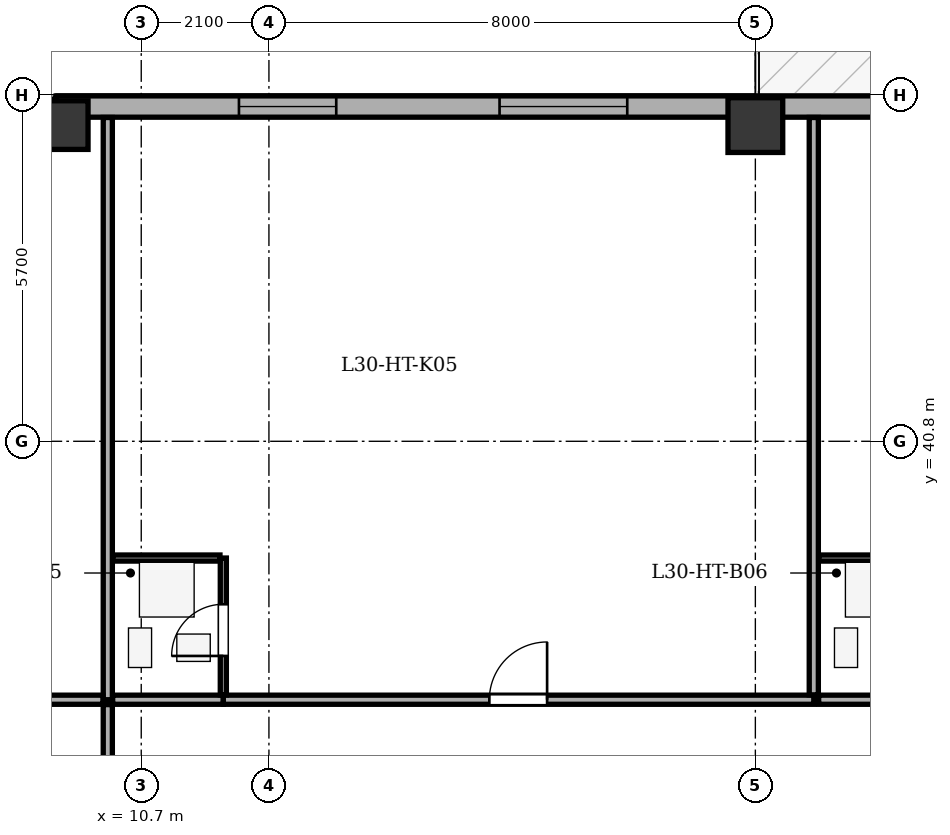
"""IFC4 building model, lengths in metres.
Left out: names, types, materials, properties, quantities, classifications, styles, units other than length and angle.
Written with IfcOpenShell. Run it as: python <this file> out.ifc"""

import sys

from ifc_helpers import new_model, si_unit, direction, frame, frame_2d, origin, origin_2d, place, context, subcontext, project, spatial, rectangle, extrude, element, fill, save


model = new_model("IFC4")
c1 = context("Model", 3, precision=1e-05, world=origin(), true_north=direction((0.0, 1.0)))
c2 = subcontext(c1, "Body", "Model", "MODEL_VIEW")
j1 = project(units=[si_unit("LENGTHUNIT", "METRE"), si_unit("PLANEANGLEUNIT", "RADIAN")], contexts=[c1])
p1 = place(None, origin())
s1 = spatial("IfcSite", under=j1, at=p1, CompositionType="ELEMENT")
p2 = place(p1, origin())
s2 = spatial("IfcBuilding", under=s1, at=p2, CompositionType="ELEMENT")
p3 = place(p2, frame((0.0, 0.0, 123.8)))
s3 = spatial("IfcBuildingStorey", under=s2, at=p3, CompositionType="ELEMENT", Elevation=123.8)
p4 = place(p3, frame((9.3, 46.0, 0.0), z_axis=(0.0, 0.0, 1.0), x_axis=(1.0, 0.0, 0.0)))
e1 = element("IfcColumn", 1, at=p4, inside=s3, PredefinedType="COLUMN", context=c2, shape_type="SweptSolid", body=[
    extrude(rectangle(XDim=0.8, YDim=1.05, at=origin_2d()), origin(), (0.0, 0.0, 1.0), 3.5),
])
p5 = place(p3, frame((20.8, 46.0, 0.0), z_axis=(0.0, 0.0, 1.0), x_axis=(1.0, 0.0, 0.0)))
e2 = element("IfcColumn", 2, at=p5, inside=s3, PredefinedType="COLUMN", context=c2, shape_type="SweptSolid", body=[
    extrude(rectangle(XDim=0.9, YDim=0.9, at=origin_2d()), origin(), (0.0, 0.0, 1.0), 3.5),
])
p6 = place(p3, frame((4.495, 41.5, 0.0), z_axis=(0.0, 0.0, 1.0), x_axis=(0.707106781187, 0.707106781187, 0.0)))
e3 = element("IfcWall", 3, at=p6, inside=s3, PredefinedType="STANDARD", context=c2, shape_type="SweptSolid", body=[
    extrude(rectangle(XDim=6.795, YDim=0.35, at=frame_2d((3.397, 0.0))), origin(), (0.0, 0.0, 1.0), 2.785),
])
p7 = place(p6, frame((2.698, 0.0, 0.75)))
e4 = element("IfcOpeningElement", 4, at=p7, cuts=e3, PredefinedType="OPENING", context=c2, shape_type="SweptSolid", body=[
    extrude(rectangle(XDim=1.4, YDim=1.65, at=frame_2d((0.7, 0.825))), frame((0.0, 0.185, 0.0), z_axis=(0.0, -1.0, 0.0), x_axis=(1.0, 0.0, 0.0)), (0.0, 0.0, 1.0), 0.37),
])
p8 = place(p3, frame((9.3, 46.305, 0.0), z_axis=(0.0, 0.0, 1.0), x_axis=(1.0, 0.0, 0.0)))
e5 = element("IfcWall", 5, at=p8, inside=s3, PredefinedType="STANDARD", context=c2, shape_type="SweptSolid", body=[
    extrude(rectangle(XDim=35.0, YDim=0.35, at=frame_2d((17.5, 0.0))), origin(), (0.0, 0.0, 1.0), 2.785),
])
p9 = place(p8, frame((14.4, 0.0, 0.0)))
e6 = element("IfcOpeningElement", 6, at=p9, cuts=e5, PredefinedType="OPENING", context=c2, shape_type="SweptSolid", body=[
    extrude(rectangle(XDim=1.0, YDim=2.02, at=frame_2d((0.5, 1.01))), frame((0.0, 0.185, 0.0), z_axis=(0.0, -1.0, 0.0), x_axis=(1.0, 0.0, 0.0)), (0.0, 0.0, 1.0), 0.37),
])
p10 = place(p8, frame((3.007, 0.0, 0.75)))
e7 = element("IfcOpeningElement", 7, at=p10, cuts=e5, PredefinedType="OPENING", context=c2, shape_type="SweptSolid", body=[
    extrude(rectangle(XDim=1.6, YDim=1.75, at=frame_2d((0.8, 0.875))), frame((0.0, 0.185, 0.0), z_axis=(0.0, -1.0, 0.0), x_axis=(1.0, 0.0, 0.0)), (0.0, 0.0, 1.0), 0.37),
])
p11 = place(p8, frame((7.293, 0.0, 0.75)))
e8 = element("IfcOpeningElement", 8, at=p11, cuts=e5, PredefinedType="OPENING", context=c2, shape_type="SweptSolid", body=[
    extrude(rectangle(XDim=2.1, YDim=1.75, at=frame_2d((1.05, 0.875))), frame((0.0, 0.185, 0.0), z_axis=(0.0, -1.0, 0.0), x_axis=(1.0, 0.0, 0.0)), (0.0, 0.0, 1.0), 0.37),
])
p12 = place(p8, frame((21.198, 0.0, 0.75)))
e9 = element("IfcOpeningElement", 9, at=p12, cuts=e5, PredefinedType="OPENING", context=c2, shape_type="SweptSolid", body=[
    extrude(rectangle(XDim=1.6, YDim=1.75, at=frame_2d((0.8, 0.875))), frame((0.0, 0.185, 0.0), z_axis=(0.0, -1.0, 0.0), x_axis=(1.0, 0.0, 0.0)), (0.0, 0.0, 1.0), 0.37),
])
p13 = place(p8, frame((27.783, 0.0, 0.75)))
e10 = element("IfcOpeningElement", 10, at=p13, cuts=e5, PredefinedType="OPENING", context=c2, shape_type="SweptSolid", body=[
    extrude(rectangle(XDim=1.6, YDim=1.75, at=frame_2d((0.8, 0.875))), frame((0.0, 0.185, 0.0), z_axis=(0.0, -1.0, 0.0), x_axis=(1.0, 0.0, 0.0)), (0.0, 0.0, 1.0), 0.37),
])
p14 = place(p8, frame((31.192, 0.0, 0.75)))
e11 = element("IfcOpeningElement", 11, at=p14, cuts=e5, PredefinedType="OPENING", context=c2, shape_type="SweptSolid", body=[
    extrude(rectangle(XDim=2.1, YDim=1.75, at=frame_2d((1.05, 0.875))), frame((0.0, 0.185, 0.0), z_axis=(0.0, -1.0, 0.0), x_axis=(1.0, 0.0, 0.0)), (0.0, 0.0, 1.0), 0.37),
])
p15 = place(p3, frame((10.15, 36.55, 0.0), z_axis=(0.0, 0.0, 1.0), x_axis=(0.0, 1.0, 0.0)))
e12 = element("IfcWall", 12, at=p15, inside=s3, PredefinedType="PARTITIONING", context=c2, shape_type="SweptSolid", body=[
    extrude(rectangle(XDim=9.575, YDim=0.15, at=frame_2d((4.788, 0.0))), origin(), (0.0, 0.0, 1.0), 3.2),
])
p16 = place(p3, frame((10.23, 36.55, 0.0), z_axis=(0.0, 0.0, 1.0), x_axis=(1.0, 0.0, 0.0)))
e13 = element("IfcWall", 13, at=p16, inside=s3, PredefinedType="PARTITIONING", context=c2, shape_type="SweptSolid", body=[
    extrude(rectangle(XDim=1.82, YDim=0.15, at=frame_2d((0.91, 0.0))), origin(), (0.0, 0.0, 1.0), 3.2),
])
p17 = place(p3, frame((12.05, 36.55, 0.0), z_axis=(0.0, 0.0, 1.0), x_axis=(1.0, 0.0, 0.0)))
e14 = element("IfcWall", 14, at=p17, inside=s3, PredefinedType="PARTITIONING", context=c2, shape_type="SweptSolid", body=[
    extrude(rectangle(XDim=9.711, YDim=0.15, at=frame_2d((4.855, 0.0))), origin(), (0.0, 0.0, 1.0), 3.2),
])
p18 = place(p17, frame((4.375, 0.0, 0.0)))
e15 = element("IfcOpeningElement", 15, at=p18, cuts=e14, PredefinedType="OPENING", context=c2, shape_type="SweptSolid", body=[
    extrude(rectangle(XDim=0.95, YDim=2.1, at=frame_2d((0.475, 1.05))), frame((0.0, 0.085, 0.0), z_axis=(0.0, -1.0, 0.0), x_axis=(1.0, 0.0, 0.0)), (0.0, 0.0, 1.0), 0.17),
])
p19 = place(p3, frame((12.05, 36.63, 0.0), z_axis=(0.0, 0.0, 1.0), x_axis=(0.0, 1.0, 0.0)))
e16 = element("IfcWall", 16, at=p19, inside=s3, PredefinedType="PARTITIONING", context=c2, shape_type="SweptSolid", body=[
    extrude(rectangle(XDim=2.25, YDim=0.1, at=frame_2d((1.125, 0.0))), origin(), (0.0, 0.0, 1.0), 3.2),
])
p20 = place(p19, frame((0.64, 0.0, 0.0)))
e17 = element("IfcOpeningElement", 17, at=p20, cuts=e16, PredefinedType="OPENING", context=c2, shape_type="SweptSolid", body=[
    extrude(rectangle(XDim=0.85, YDim=2.05, at=frame_2d((0.425, 1.025))), frame((0.0, 0.06, 0.0), z_axis=(0.0, -1.0, 0.0), x_axis=(1.0, 0.0, 0.0)), (0.0, 0.0, 1.0), 0.12),
])
p21 = place(p3, frame((10.23, 38.88, 0.0), z_axis=(0.0, 0.0, 1.0), x_axis=(1.0, 0.0, 0.0)))
e18 = element("IfcWall", 18, at=p21, inside=s3, PredefinedType="PARTITIONING", context=c2, shape_type="SweptSolid", body=[
    extrude(rectangle(XDim=1.765, YDim=0.1, at=frame_2d((0.883, 0.0))), origin(), (0.0, 0.0, 1.0), 3.2),
])
p22 = place(p3, frame((21.761, 36.63, 0.0), z_axis=(0.0, 0.0, 1.0), x_axis=(0.0, 1.0, 0.0)))
e19 = element("IfcWall", 19, at=p22, inside=s3, PredefinedType="PARTITIONING", context=c2, shape_type="SweptSolid", body=[
    extrude(rectangle(XDim=9.495, YDim=0.15, at=frame_2d((4.748, 0.0))), origin(), (0.0, 0.0, 1.0), 3.2),
])
p23 = place(p3, frame((21.841, 36.55, 0.0), z_axis=(0.0, 0.0, 1.0), x_axis=(1.0, 0.0, 0.0)))
e20 = element("IfcWall", 20, at=p23, inside=s3, PredefinedType="PARTITIONING", context=c2, shape_type="SweptSolid", body=[
    extrude(rectangle(XDim=1.82, YDim=0.15, at=frame_2d((0.91, 0.0))), origin(), (0.0, 0.0, 1.0), 3.2),
])
p24 = place(p3, frame((21.841, 38.88, 0.0), z_axis=(0.0, 0.0, 1.0), x_axis=(1.0, 0.0, 0.0)))
e21 = element("IfcWall", 21, at=p24, inside=s3, PredefinedType="PARTITIONING", context=c2, shape_type="SweptSolid", body=[
    extrude(rectangle(XDim=1.765, YDim=0.1, at=frame_2d((0.882, 0.0))), origin(), (0.0, 0.0, 1.0), 3.2),
])
p25 = place(p3, frame((4.675, 36.55, 0.0), z_axis=(0.0, 0.0, 1.0), x_axis=(1.0, 0.0, 0.0)))
e22 = element("IfcWall", 22, at=p25, inside=s3, PredefinedType="PARTITIONING", context=c2, shape_type="SweptSolid", body=[
    extrude(rectangle(XDim=5.395, YDim=0.15, at=frame_2d((2.698, 0.0))), origin(), (0.0, 0.0, 1.0), 3.2),
])
p26 = place(p3, frame((10.15, 17.93, 0.0), z_axis=(0.0, 0.0, 1.0), x_axis=(0.0, 1.0, 0.0)))
e23 = element("IfcWall", 23, at=p26, inside=s3, PredefinedType="PARTITIONING", context=c2, shape_type="SweptSolid", body=[
    extrude(rectangle(XDim=18.54, YDim=0.15, at=frame_2d((9.27, 0.0))), origin(), (0.0, 0.0, 1.0), 3.2),
])
p27 = place(p26, frame((8.79, 0.0, 0.0)))
e24 = element("IfcOpeningElement", 24, at=p27, cuts=e23, PredefinedType="OPENING", context=c2, shape_type="SweptSolid", body=[
    extrude(rectangle(XDim=0.95, YDim=2.1, at=frame_2d((0.475, 1.05))), frame((0.0, 0.085, 0.0), z_axis=(0.0, -1.0, 0.0), x_axis=(1.0, 0.0, 0.0)), (0.0, 0.0, 1.0), 0.17),
])
p28 = place(p10, origin())
e25 = element("IfcWindow", 25, at=p28, inside=s3, PartitioningType="SINGLE_PANEL", PredefinedType="WINDOW", context=c2, shape_type="SweptSolid", body=[
    extrude(rectangle(XDim=1.6, YDim=1.75, at=frame_2d((0.8, 0.875))), frame((0.0, -0.01, 0.0), z_axis=(0.0, -1.0, 0.0), x_axis=(1.0, 0.0, 0.0)), (0.0, 0.0, 1.0), 0.06),
])
fill(e7, e25)
p29 = place(p11, origin())
e26 = element("IfcWindow", 26, at=p29, inside=s3, PartitioningType="SINGLE_PANEL", PredefinedType="WINDOW", context=c2, shape_type="SweptSolid", body=[
    extrude(rectangle(XDim=2.1, YDim=1.75, at=frame_2d((1.05, 0.875))), frame((0.0, -0.01, 0.0), z_axis=(0.0, -1.0, 0.0), x_axis=(1.0, 0.0, 0.0)), (0.0, 0.0, 1.0), 0.06),
])
fill(e8, e26)
p30 = place(p20, origin())
e27 = element("IfcDoor", 27, at=p30, inside=s3, OperationType="SINGLE_SWING_LEFT", PredefinedType="DOOR", context=c2, shape_type="SweptSolid", body=[
    extrude(rectangle(XDim=0.85, YDim=2.05, at=frame_2d((0.425, 1.025))), frame((0.0, 0.025, 0.0), z_axis=(0.0, -1.0, 0.0), x_axis=(1.0, 0.0, 0.0)), (0.0, 0.0, 1.0), 0.05),
])
fill(e17, e27)
p31 = place(p18, origin())
e28 = element("IfcDoor", 28, at=p31, inside=s3, OperationType="SINGLE_SWING_RIGHT", PredefinedType="DOOR", context=c2, shape_type="SweptSolid", body=[
    extrude(rectangle(XDim=0.95, YDim=2.1, at=frame_2d((0.475, 1.05))), frame((0.0, 0.025, 0.0), z_axis=(0.0, -1.0, 0.0), x_axis=(1.0, 0.0, 0.0)), (0.0, 0.0, 1.0), 0.05),
])
fill(e15, e28)
save(model, sys.argv[1])
